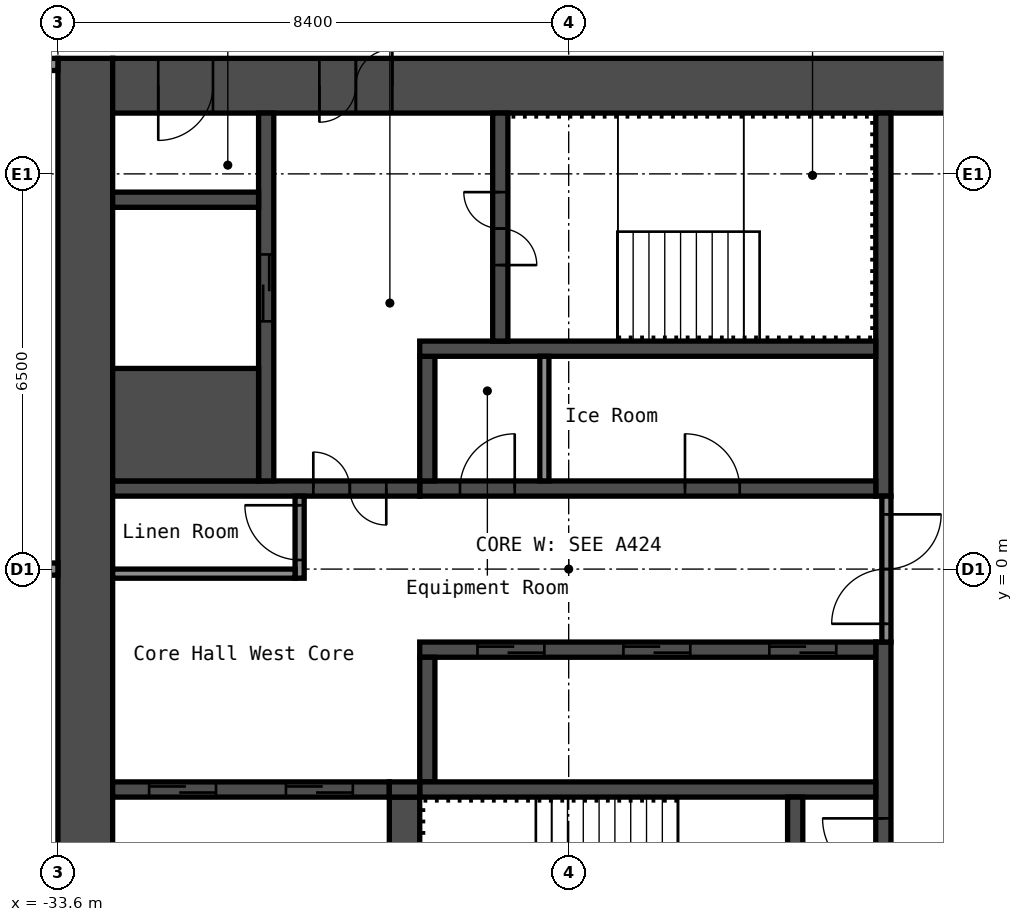
"""IFC4 building model, lengths in metres.
Left out: names, types, materials, properties, quantities, classifications, styles, units other than length and angle.
Written with IfcOpenShell. Run it as: python <this file> out.ifc"""

import sys

from ifc_helpers import new_model, si_unit, direction, frame, frame_2d, origin, place, context, subcontext, project, spatial, rectangle, extrude, element, fill, save


model = new_model("IFC4")
c1 = context("Model", 3, precision=1e-05, world=origin(), true_north=direction((0.0, 1.0)))
c2 = subcontext(c1, "Body", "Model", "MODEL_VIEW")
j1 = project(units=[si_unit("LENGTHUNIT", "METRE"), si_unit("PLANEANGLEUNIT", "RADIAN")], contexts=[c1])
p1 = place(None, origin())
s1 = spatial("IfcSite", under=j1, at=p1, CompositionType="ELEMENT")
p2 = place(p1, origin())
s2 = spatial("IfcBuilding", under=s1, at=p2, CompositionType="ELEMENT")
p3 = place(p2, frame((0.0, 0.0, 163.0)))
s3 = spatial("IfcBuildingStorey", under=s2, at=p3, CompositionType="ELEMENT", Elevation=163.0)
p4 = place(p3, frame((-33.15, -8.4, 0.0), z_axis=(0.0, 0.0, 1.0), x_axis=(0.0, 1.0, 0.0)))
e1 = element("IfcWall", 1, at=p4, inside=s3, PredefinedType="SHEAR", context=c2, shape_type="SweptSolid", body=[
    extrude(rectangle(XDim=16.8, YDim=0.9, at=frame_2d((8.4, 0.0))), origin(), (0.0, 0.0, 1.0), 2.75),
])
p5 = place(p3, frame((-32.7, 7.95, 0.0), z_axis=(0.0, 0.0, 1.0), x_axis=(1.0, 0.0, 0.0)))
e2 = element("IfcWall", 2, at=p5, inside=s3, PredefinedType="SHEAR", context=c2, shape_type="SweptSolid", body=[
    extrude(rectangle(XDim=15.0, YDim=0.9, at=frame_2d((7.5, 0.0))), origin(), (0.0, 0.0, 1.0), 2.75),
])
p6 = place(p5, frame((3.4, 0.0, 0.0)))
e3 = element("IfcOpeningElement", 3, at=p6, cuts=e2, PredefinedType="OPENING", context=c2, shape_type="SweptSolid", body=[
    extrude(rectangle(XDim=1.2, YDim=2.1, at=frame_2d((0.6, 1.05))), frame((0.0, 0.46, 0.0), z_axis=(0.0, -1.0, 0.0), x_axis=(1.0, 0.0, 0.0)), (0.0, 0.0, 1.0), 0.92),
])
p7 = place(p5, frame((0.75, 0.0, 0.0)))
e4 = element("IfcOpeningElement", 4, at=p7, cuts=e2, PredefinedType="OPENING", context=c2, shape_type="SweptSolid", body=[
    extrude(rectangle(XDim=0.9, YDim=2.1, at=frame_2d((0.45, 1.05))), frame((0.0, 0.46, 0.0), z_axis=(0.0, -1.0, 0.0), x_axis=(1.0, 0.0, 0.0)), (0.0, 0.0, 1.0), 0.92),
])
p8 = place(p3, frame((-20.025, 1.2, 0.0), z_axis=(0.0, 0.0, 1.0), x_axis=(0.0, 1.0, 0.0)))
e5 = element("IfcWall", 5, at=p8, inside=s3, PredefinedType="SHEAR", context=c2, shape_type="SweptSolid", body=[
    extrude(rectangle(XDim=6.3, YDim=0.25, at=frame_2d((3.15, 0.0))), origin(), (0.0, 0.0, 1.0), 2.75),
])
p9 = place(p3, frame((-20.025, -7.5, 0.0), z_axis=(0.0, 0.0, 1.0), x_axis=(0.0, 1.0, 0.0)))
e6 = element("IfcWall", 6, at=p9, inside=s3, PredefinedType="SHEAR", context=c2, shape_type="SweptSolid", body=[
    extrude(rectangle(XDim=6.3, YDim=0.25, at=frame_2d((3.15, 0.0))), origin(), (0.0, 0.0, 1.0), 2.75),
])
p10 = place(p9, frame((2.4, 0.0, 0.0)))
e7 = element("IfcOpeningElement", 7, at=p10, cuts=e6, PredefinedType="OPENING", context=c2, shape_type="SweptSolid", body=[
    extrude(rectangle(XDim=1.0, YDim=2.1, at=frame_2d((0.5, 1.05))), frame((0.0, 0.135, 0.0), z_axis=(0.0, -1.0, 0.0), x_axis=(1.0, 0.0, 0.0)), (0.0, 0.0, 1.0), 0.27),
])
p11 = place(p3, frame((-27.65, 1.325, 0.0), z_axis=(0.0, 0.0, 1.0), x_axis=(1.0, 0.0, 0.0)))
e8 = element("IfcWall", 8, at=p11, inside=s3, PredefinedType="SHEAR", context=c2, shape_type="SweptSolid", body=[
    extrude(rectangle(XDim=7.5, YDim=0.25, at=frame_2d((3.75, 0.0))), origin(), (0.0, 0.0, 1.0), 2.75),
])
p12 = place(p11, frame((4.363, 0.0, 0.0)))
e9 = element("IfcOpeningElement", 9, at=p12, cuts=e8, PredefinedType="OPENING", context=c2, shape_type="SweptSolid", body=[
    extrude(rectangle(XDim=0.9, YDim=2.1, at=frame_2d((0.45, 1.05))), frame((0.0, 0.135, 0.0), z_axis=(0.0, -1.0, 0.0), x_axis=(1.0, 0.0, 0.0)), (0.0, 0.0, 1.0), 0.27),
])
p13 = place(p11, frame((0.663, 0.0, 0.0)))
e10 = element("IfcOpeningElement", 10, at=p13, cuts=e8, PredefinedType="OPENING", context=c2, shape_type="SweptSolid", body=[
    extrude(rectangle(XDim=0.9, YDim=2.1, at=frame_2d((0.45, 1.05))), frame((0.0, 0.135, 0.0), z_axis=(0.0, -1.0, 0.0), x_axis=(1.0, 0.0, 0.0)), (0.0, 0.0, 1.0), 0.27),
])
p14 = place(p3, frame((-27.525, 1.45, 0.0), z_axis=(0.0, 0.0, 1.0), x_axis=(0.0, 1.0, 0.0)))
e11 = element("IfcWall", 11, at=p14, inside=s3, PredefinedType="SHEAR", context=c2, shape_type="SweptSolid", body=[
    extrude(rectangle(XDim=2.05, YDim=0.25, at=frame_2d((1.025, 0.0))), origin(), (0.0, 0.0, 1.0), 2.75),
])
p15 = place(p3, frame((-27.65, 3.625, 0.0), z_axis=(0.0, 0.0, 1.0), x_axis=(1.0, 0.0, 0.0)))
e12 = element("IfcWall", 12, at=p15, inside=s3, PredefinedType="SHEAR", context=c2, shape_type="SweptSolid", body=[
    extrude(rectangle(XDim=7.5, YDim=0.25, at=frame_2d((3.75, 0.0))), origin(), (0.0, 0.0, 1.0), 2.75),
])
p16 = place(p3, frame((-26.325, 3.75, 0.0), z_axis=(0.0, 0.0, 1.0), x_axis=(0.0, 1.0, 0.0)))
e13 = element("IfcWall", 13, at=p16, inside=s3, PredefinedType="SHEAR", context=c2, shape_type="SweptSolid", body=[
    extrude(rectangle(XDim=3.75, YDim=0.25, at=frame_2d((1.875, 0.0))), origin(), (0.0, 0.0, 1.0), 2.75),
])
p17 = place(p16, frame((1.25, 0.0, 0.0)))
e14 = element("IfcOpeningElement", 14, at=p17, cuts=e13, PredefinedType="OPENING", context=c2, shape_type="SweptSolid", body=[
    extrude(rectangle(XDim=1.2, YDim=2.1, at=frame_2d((0.6, 1.05))), frame((0.0, 0.135, 0.0), z_axis=(0.0, -1.0, 0.0), x_axis=(1.0, 0.0, 0.0)), (0.0, 0.0, 1.0), 0.27),
])
p18 = place(p3, frame((-32.7, 1.325, 0.0), z_axis=(0.0, 0.0, 1.0), x_axis=(1.0, 0.0, 0.0)))
e15 = element("IfcWall", 15, at=p18, inside=s3, PredefinedType="SHEAR", context=c2, shape_type="SweptSolid", body=[
    extrude(rectangle(XDim=5.05, YDim=0.25, at=frame_2d((2.525, 0.0))), origin(), (0.0, 0.0, 1.0), 2.75),
])
p19 = place(p18, frame((3.3, 0.0, 0.0)))
e16 = element("IfcOpeningElement", 16, at=p19, cuts=e15, PredefinedType="OPENING", context=c2, shape_type="SweptSolid", body=[
    extrude(rectangle(XDim=1.2, YDim=2.1, at=frame_2d((0.6, 1.05))), frame((0.0, 0.135, 0.0), z_axis=(0.0, -1.0, 0.0), x_axis=(1.0, 0.0, 0.0)), (0.0, 0.0, 1.0), 0.27),
])
p20 = place(p3, frame((-30.175, 1.45, 0.0), z_axis=(0.0, 0.0, 1.0), x_axis=(0.0, 1.0, 0.0)))
e17 = element("IfcWall", 17, at=p20, inside=s3, PredefinedType="SHEAR", context=c2, shape_type="SweptSolid", body=[
    extrude(rectangle(XDim=6.05, YDim=0.25, at=frame_2d((3.025, 0.0))), origin(), (0.0, 0.0, 1.0), 2.75),
])
p21 = place(p20, frame((2.625, 0.0, 0.0)))
e18 = element("IfcOpeningElement", 18, at=p21, cuts=e17, PredefinedType="OPENING", context=c2, shape_type="SweptSolid", body=[
    extrude(rectangle(XDim=1.1, YDim=2.1, at=frame_2d((0.55, 1.05))), frame((0.0, 0.135, 0.0), z_axis=(0.0, -1.0, 0.0), x_axis=(1.0, 0.0, 0.0)), (0.0, 0.0, 1.0), 0.27),
])
p22 = place(p3, frame((-32.7, 2.375, 0.0), z_axis=(0.0, 0.0, 1.0), x_axis=(1.0, 0.0, 0.0)))
e19 = element("IfcWall", 19, at=p22, inside=s3, PredefinedType="SHEAR", context=c2, shape_type="SweptSolid", body=[
    extrude(rectangle(XDim=2.4, YDim=1.85, at=frame_2d((1.2, 0.0))), origin(), (0.0, 0.0, 1.0), 2.75),
])
p23 = place(p3, frame((-32.7, 6.075, 0.0), z_axis=(0.0, 0.0, 1.0), x_axis=(1.0, 0.0, 0.0)))
e20 = element("IfcWall", 20, at=p23, inside=s3, PredefinedType="SHEAR", context=c2, shape_type="SweptSolid", body=[
    extrude(rectangle(XDim=2.4, YDim=0.25, at=frame_2d((1.2, 0.0))), origin(), (0.0, 0.0, 1.0), 2.75),
])
p24 = place(p3, frame((-27.65, -1.325, 0.0), z_axis=(0.0, 0.0, 1.0), x_axis=(1.0, 0.0, 0.0)))
e21 = element("IfcWall", 21, at=p24, inside=s3, PredefinedType="SHEAR", context=c2, shape_type="SweptSolid", body=[
    extrude(rectangle(XDim=7.5, YDim=0.25, at=frame_2d((3.75, 0.0))), origin(), (0.0, 0.0, 1.0), 2.75),
])
p25 = place(p24, frame((5.75, 0.0, 0.0)))
e22 = element("IfcOpeningElement", 22, at=p25, cuts=e21, PredefinedType="OPENING", context=c2, shape_type="SweptSolid", body=[
    extrude(rectangle(XDim=1.1, YDim=2.1, at=frame_2d((0.55, 1.05))), frame((0.0, 0.135, 0.0), z_axis=(0.0, -1.0, 0.0), x_axis=(1.0, 0.0, 0.0)), (0.0, 0.0, 1.0), 0.27),
])
p26 = place(p24, frame((3.35, 0.0, 0.0)))
e23 = element("IfcOpeningElement", 23, at=p26, cuts=e21, PredefinedType="OPENING", context=c2, shape_type="SweptSolid", body=[
    extrude(rectangle(XDim=1.1, YDim=2.1, at=frame_2d((0.55, 1.05))), frame((0.0, 0.135, 0.0), z_axis=(0.0, -1.0, 0.0), x_axis=(1.0, 0.0, 0.0)), (0.0, 0.0, 1.0), 0.27),
])
p27 = place(p24, frame((0.95, 0.0, 0.0)))
e24 = element("IfcOpeningElement", 24, at=p27, cuts=e21, PredefinedType="OPENING", context=c2, shape_type="SweptSolid", body=[
    extrude(rectangle(XDim=1.1, YDim=2.1, at=frame_2d((0.55, 1.05))), frame((0.0, 0.135, 0.0), z_axis=(0.0, -1.0, 0.0), x_axis=(1.0, 0.0, 0.0)), (0.0, 0.0, 1.0), 0.27),
])
p28 = place(p3, frame((-27.525, -3.5, 0.0), z_axis=(0.0, 0.0, 1.0), x_axis=(0.0, 1.0, 0.0)))
e25 = element("IfcWall", 25, at=p28, inside=s3, PredefinedType="SHEAR", context=c2, shape_type="SweptSolid", body=[
    extrude(rectangle(XDim=2.05, YDim=0.25, at=frame_2d((1.025, 0.0))), origin(), (0.0, 0.0, 1.0), 2.75),
])
p29 = place(p3, frame((-27.65, -3.625, 0.0), z_axis=(0.0, 0.0, 1.0), x_axis=(1.0, 0.0, 0.0)))
e26 = element("IfcWall", 26, at=p29, inside=s3, PredefinedType="SHEAR", context=c2, shape_type="SweptSolid", body=[
    extrude(rectangle(XDim=7.5, YDim=0.25, at=frame_2d((3.75, 0.0))), origin(), (0.0, 0.0, 1.0), 2.75),
])
p30 = place(p3, frame((-21.475, -7.5, 0.0), z_axis=(0.0, 0.0, 1.0), x_axis=(0.0, 1.0, 0.0)))
e27 = element("IfcWall", 27, at=p30, inside=s3, PredefinedType="SHEAR", context=c2, shape_type="SweptSolid", body=[
    extrude(rectangle(XDim=3.75, YDim=0.25, at=frame_2d((1.875, 0.0))), origin(), (0.0, 0.0, 1.0), 2.75),
])
p31 = place(p30, frame((1.3, 0.0, 0.0)))
e28 = element("IfcOpeningElement", 28, at=p31, cuts=e27, PredefinedType="OPENING", context=c2, shape_type="SweptSolid", body=[
    extrude(rectangle(XDim=1.2, YDim=2.1, at=frame_2d((0.6, 1.05))), frame((0.0, 0.135, 0.0), z_axis=(0.0, -1.0, 0.0), x_axis=(1.0, 0.0, 0.0)), (0.0, 0.0, 1.0), 0.27),
])
p32 = place(p3, frame((-27.9, -7.5, 0.0), z_axis=(0.0, 0.0, 1.0), x_axis=(0.0, 1.0, 0.0)))
e29 = element("IfcWall", 29, at=p32, inside=s3, PredefinedType="SHEAR", context=c2, shape_type="SweptSolid", body=[
    extrude(rectangle(XDim=3.75, YDim=0.5, at=frame_2d((1.875, 0.0))), origin(), (0.0, 0.0, 1.0), 2.75),
])
p33 = place(p3, frame((-32.7, -3.625, 0.0), z_axis=(0.0, 0.0, 1.0), x_axis=(1.0, 0.0, 0.0)))
e30 = element("IfcWall", 30, at=p33, inside=s3, PredefinedType="SHEAR", context=c2, shape_type="SweptSolid", body=[
    extrude(rectangle(XDim=4.55, YDim=0.25, at=frame_2d((2.275, 0.0))), origin(), (0.0, 0.0, 1.0), 2.75),
])
p34 = place(p33, frame((2.85, 0.0, 0.0)))
e31 = element("IfcOpeningElement", 31, at=p34, cuts=e30, PredefinedType="OPENING", context=c2, shape_type="SweptSolid", body=[
    extrude(rectangle(XDim=1.1, YDim=2.1, at=frame_2d((0.55, 1.05))), frame((0.0, 0.135, 0.0), z_axis=(0.0, -1.0, 0.0), x_axis=(1.0, 0.0, 0.0)), (0.0, 0.0, 1.0), 0.27),
])
p35 = place(p33, frame((0.6, 0.0, 0.0)))
e32 = element("IfcOpeningElement", 32, at=p35, cuts=e30, PredefinedType="OPENING", context=c2, shape_type="SweptSolid", body=[
    extrude(rectangle(XDim=1.1, YDim=2.1, at=frame_2d((0.55, 1.05))), frame((0.0, 0.135, 0.0), z_axis=(0.0, -1.0, 0.0), x_axis=(1.0, 0.0, 0.0)), (0.0, 0.0, 1.0), 0.27),
])
p36 = place(p3, frame((-28.15, -3.625, 0.0), z_axis=(0.0, 0.0, 1.0), x_axis=(1.0, 0.0, 0.0)))
e33 = element("IfcWall", 33, at=p36, inside=s3, PredefinedType="SHEAR", context=c2, shape_type="SweptSolid", body=[
    extrude(rectangle(XDim=0.5, YDim=0.25, at=frame_2d((0.25, 0.0))), origin(), (0.0, 0.0, 1.0), 2.75),
])
p37 = place(p3, frame((-19.975, -1.2, 0.0), z_axis=(0.0, 0.0, 1.0), x_axis=(0.0, 1.0, 0.0)))
e34 = element("IfcWall", 34, at=p37, inside=s3, PredefinedType="PARTITIONING", context=c2, shape_type="SweptSolid", body=[
    extrude(rectangle(XDim=2.4, YDim=0.15, at=frame_2d((1.2, 0.0))), origin(), (0.0, 0.0, 1.0), 2.75),
])
p38 = place(p37, frame((0.3, 0.0, 0.0)))
e35 = element("IfcOpeningElement", 35, at=p38, cuts=e34, PredefinedType="OPENING", context=c2, shape_type="SweptSolid", body=[
    extrude(rectangle(XDim=1.8, YDim=2.1, at=frame_2d((0.9, 1.05))), frame((0.0, 0.085, 0.0), z_axis=(0.0, -1.0, 0.0), x_axis=(1.0, 0.0, 0.0)), (0.0, 0.0, 1.0), 0.17),
])
p39 = place(p3, frame((-29.625, -0.15, 0.0), z_axis=(0.0, 0.0, 1.0), x_axis=(0.0, 1.0, 0.0)))
e36 = element("IfcWall", 36, at=p39, inside=s3, PredefinedType="PARTITIONING", context=c2, shape_type="SweptSolid", body=[
    extrude(rectangle(XDim=1.35, YDim=0.15, at=frame_2d((0.675, 0.0))), origin(), (0.0, 0.0, 1.0), 2.75),
])
p40 = place(p39, frame((0.3, 0.0, 0.0)))
e37 = element("IfcOpeningElement", 37, at=p40, cuts=e36, PredefinedType="OPENING", context=c2, shape_type="SweptSolid", body=[
    extrude(rectangle(XDim=0.9, YDim=2.1, at=frame_2d((0.45, 1.05))), frame((0.0, 0.085, 0.0), z_axis=(0.0, -1.0, 0.0), x_axis=(1.0, 0.0, 0.0)), (0.0, 0.0, 1.0), 0.17),
])
p41 = place(p3, frame((-32.7, -0.075, 0.0), z_axis=(0.0, 0.0, 1.0), x_axis=(1.0, 0.0, 0.0)))
e38 = element("IfcWall", 38, at=p41, inside=s3, PredefinedType="PARTITIONING", context=c2, shape_type="SweptSolid", body=[
    extrude(rectangle(XDim=3.0, YDim=0.15, at=frame_2d((1.5, 0.0))), origin(), (0.0, 0.0, 1.0), 2.75),
])
p42 = place(p3, frame((-25.6, 1.45, 0.0), z_axis=(0.0, 0.0, 1.0), x_axis=(0.0, 1.0, 0.0)))
e39 = element("IfcWall", 39, at=p42, inside=s3, PredefinedType="PARTITIONING", context=c2, shape_type="SweptSolid", body=[
    extrude(rectangle(XDim=2.05, YDim=0.15, at=frame_2d((1.025, 0.0))), origin(), (0.0, 0.0, 1.0), 2.75),
])
p43 = place(p3, frame((-40.1, 0.0, 0.0), z_axis=(0.0, 0.0, 1.0), x_axis=(1.0, 0.0, 0.0)))
e40 = element("IfcWall", 40, at=p43, inside=s3, PredefinedType="PARTITIONING", context=c2, shape_type="SweptSolid", body=[
    extrude(rectangle(XDim=6.5, YDim=0.2, at=frame_2d((3.25, 0.0))), origin(), (0.0, 0.0, 1.0), 2.75),
])
p44 = place(p3, frame((-40.2, 8.3, 0.0), z_axis=(0.0, 0.0, 1.0), x_axis=(1.0, 0.0, 0.0)))
e41 = element("IfcWall", 41, at=p44, inside=s3, PredefinedType="PARTITIONING", context=c2, shape_type="SweptSolid", body=[
    extrude(rectangle(XDim=6.6, YDim=0.2, at=frame_2d((3.3, 0.0))), origin(), (0.0, 0.0, 1.0), 2.75),
])
p45 = place(p44, frame((0.805, 0.0, 0.0)))
e42 = element("IfcOpeningElement", 42, at=p45, cuts=e41, PredefinedType="OPENING", context=c2, shape_type="SweptSolid", body=[
    extrude(rectangle(XDim=0.9, YDim=2.1, at=frame_2d((0.45, 1.05))), frame((0.0, 0.11, 0.0), z_axis=(0.0, -1.0, 0.0), x_axis=(1.0, 0.0, 0.0)), (0.0, 0.0, 1.0), 0.22),
])
p46 = place(p44, frame((4.105, 0.0, 0.0)))
e43 = element("IfcOpeningElement", 43, at=p46, cuts=e41, PredefinedType="OPENING", context=c2, shape_type="SweptSolid", body=[
    extrude(rectangle(XDim=0.9, YDim=2.1, at=frame_2d((0.45, 1.05))), frame((0.0, 0.11, 0.0), z_axis=(0.0, -1.0, 0.0), x_axis=(1.0, 0.0, 0.0)), (0.0, 0.0, 1.0), 0.22),
])
p47 = place(p6, origin())
e44 = element("IfcDoor", 44, at=p47, inside=s3, OperationType="DOUBLE_DOOR_SINGLE_SWING", PredefinedType="DOOR", context=c2, shape_type="SweptSolid", body=[
    extrude(rectangle(XDim=1.2, YDim=2.1, at=frame_2d((0.6, 1.05))), frame((0.0, 0.025, 0.0), z_axis=(0.0, -1.0, 0.0), x_axis=(1.0, 0.0, 0.0)), (0.0, 0.0, 1.0), 0.05),
])
fill(e3, e44)
p48 = place(p7, origin())
e45 = element("IfcDoor", 45, at=p48, inside=s3, OperationType="SINGLE_SWING_LEFT", PredefinedType="DOOR", context=c2, shape_type="SweptSolid", body=[
    extrude(rectangle(XDim=0.9, YDim=2.1, at=frame_2d((0.45, 1.05))), frame((0.0, 0.025, 0.0), z_axis=(0.0, -1.0, 0.0), x_axis=(1.0, 0.0, 0.0)), (0.0, 0.0, 1.0), 0.05),
])
fill(e4, e45)
p49 = place(p17, origin())
e46 = element("IfcDoor", 46, at=p49, inside=s3, OperationType="DOUBLE_DOOR_SINGLE_SWING", PredefinedType="DOOR", context=c2, shape_type="SweptSolid", body=[
    extrude(rectangle(XDim=1.2, YDim=2.1, at=frame_2d((0.6, 1.05))), frame((0.0, 0.025, 0.0), z_axis=(0.0, -1.0, 0.0), x_axis=(1.0, 0.0, 0.0)), (0.0, 0.0, 1.0), 0.05),
])
fill(e14, e46)
p50 = place(p10, origin())
e47 = element("IfcDoor", 47, at=p50, inside=s3, OperationType="SINGLE_SWING_LEFT", PredefinedType="DOOR", context=c2, shape_type="SweptSolid", body=[
    extrude(rectangle(XDim=1.0, YDim=2.1, at=frame_2d((0.5, 1.05))), frame((0.0, 0.025, 0.0), z_axis=(0.0, -1.0, 0.0), x_axis=(1.0, 0.0, 0.0)), (0.0, 0.0, 1.0), 0.05),
])
fill(e7, e47)
p51 = place(p19, origin())
e48 = element("IfcDoor", 48, at=p51, inside=s3, OperationType="DOUBLE_DOOR_SINGLE_SWING", PredefinedType="DOOR", context=c2, shape_type="SweptSolid", body=[
    extrude(rectangle(XDim=1.2, YDim=2.1, at=frame_2d((0.6, 1.05))), frame((0.0, 0.025, 0.0), z_axis=(0.0, -1.0, 0.0), x_axis=(1.0, 0.0, 0.0)), (0.0, 0.0, 1.0), 0.05),
])
fill(e16, e48)
p52 = place(p38, origin())
e49 = element("IfcDoor", 49, at=p52, inside=s3, OperationType="DOUBLE_DOOR_SINGLE_SWING", PredefinedType="DOOR", context=c2, shape_type="SweptSolid", body=[
    extrude(rectangle(XDim=1.8, YDim=2.1, at=frame_2d((0.9, 1.05))), frame((0.0, 0.025, 0.0), z_axis=(0.0, -1.0, 0.0), x_axis=(1.0, 0.0, 0.0)), (0.0, 0.0, 1.0), 0.05),
])
fill(e35, e49)
p53 = place(p40, origin())
e50 = element("IfcDoor", 50, at=p53, inside=s3, OperationType="SINGLE_SWING_LEFT", PredefinedType="DOOR", context=c2, shape_type="SweptSolid", body=[
    extrude(rectangle(XDim=0.9, YDim=2.1, at=frame_2d((0.45, 1.05))), frame((0.0, 0.025, 0.0), z_axis=(0.0, -1.0, 0.0), x_axis=(1.0, 0.0, 0.0)), (0.0, 0.0, 1.0), 0.05),
])
fill(e37, e50)
p54 = place(p12, origin())
e51 = element("IfcDoor", 51, at=p54, inside=s3, OperationType="SINGLE_SWING_RIGHT", PredefinedType="DOOR", context=c2, shape_type="SweptSolid", body=[
    extrude(rectangle(XDim=0.9, YDim=2.1, at=frame_2d((0.45, 1.05))), frame((0.0, 0.025, 0.0), z_axis=(0.0, -1.0, 0.0), x_axis=(1.0, 0.0, 0.0)), (0.0, 0.0, 1.0), 0.05),
])
fill(e9, e51)
p55 = place(p13, origin())
e52 = element("IfcDoor", 52, at=p55, inside=s3, OperationType="SINGLE_SWING_LEFT", PredefinedType="DOOR", context=c2, shape_type="SweptSolid", body=[
    extrude(rectangle(XDim=0.9, YDim=2.1, at=frame_2d((0.45, 1.05))), frame((0.0, 0.025, 0.0), z_axis=(0.0, -1.0, 0.0), x_axis=(1.0, 0.0, 0.0)), (0.0, 0.0, 1.0), 0.05),
])
fill(e10, e52)
p56 = place(p25, origin())
e53 = element("IfcDoor", 53, at=p56, inside=s3, OperationType="DOUBLE_DOOR_SLIDING", PredefinedType="DOOR", context=c2, shape_type="SweptSolid", body=[
    extrude(rectangle(XDim=1.1, YDim=2.1, at=frame_2d((0.55, 1.05))), frame((0.0, 0.025, 0.0), z_axis=(0.0, -1.0, 0.0), x_axis=(1.0, 0.0, 0.0)), (0.0, 0.0, 1.0), 0.05),
])
fill(e22, e53)
p57 = place(p26, origin())
e54 = element("IfcDoor", 54, at=p57, inside=s3, OperationType="DOUBLE_DOOR_SLIDING", PredefinedType="DOOR", context=c2, shape_type="SweptSolid", body=[
    extrude(rectangle(XDim=1.1, YDim=2.1, at=frame_2d((0.55, 1.05))), frame((0.0, 0.025, 0.0), z_axis=(0.0, -1.0, 0.0), x_axis=(1.0, 0.0, 0.0)), (0.0, 0.0, 1.0), 0.05),
])
fill(e23, e54)
p58 = place(p27, origin())
e55 = element("IfcDoor", 55, at=p58, inside=s3, OperationType="DOUBLE_DOOR_SLIDING", PredefinedType="DOOR", context=c2, shape_type="SweptSolid", body=[
    extrude(rectangle(XDim=1.1, YDim=2.1, at=frame_2d((0.55, 1.05))), frame((0.0, 0.025, 0.0), z_axis=(0.0, -1.0, 0.0), x_axis=(1.0, 0.0, 0.0)), (0.0, 0.0, 1.0), 0.05),
])
fill(e24, e55)
p59 = place(p21, origin())
e56 = element("IfcDoor", 56, at=p59, inside=s3, OperationType="DOUBLE_DOOR_SLIDING", PredefinedType="DOOR", context=c2, shape_type="SweptSolid", body=[
    extrude(rectangle(XDim=1.1, YDim=2.1, at=frame_2d((0.55, 1.05))), frame((0.0, 0.025, 0.0), z_axis=(0.0, -1.0, 0.0), x_axis=(1.0, 0.0, 0.0)), (0.0, 0.0, 1.0), 0.05),
])
fill(e18, e56)
p60 = place(p34, origin())
e57 = element("IfcDoor", 57, at=p60, inside=s3, OperationType="DOUBLE_DOOR_SLIDING", PredefinedType="DOOR", context=c2, shape_type="SweptSolid", body=[
    extrude(rectangle(XDim=1.1, YDim=2.1, at=frame_2d((0.55, 1.05))), frame((0.0, 0.025, 0.0), z_axis=(0.0, -1.0, 0.0), x_axis=(1.0, 0.0, 0.0)), (0.0, 0.0, 1.0), 0.05),
])
fill(e31, e57)
p61 = place(p35, origin())
e58 = element("IfcDoor", 58, at=p61, inside=s3, OperationType="DOUBLE_DOOR_SLIDING", PredefinedType="DOOR", context=c2, shape_type="SweptSolid", body=[
    extrude(rectangle(XDim=1.1, YDim=2.1, at=frame_2d((0.55, 1.05))), frame((0.0, 0.025, 0.0), z_axis=(0.0, -1.0, 0.0), x_axis=(1.0, 0.0, 0.0)), (0.0, 0.0, 1.0), 0.05),
])
fill(e32, e58)
save(model, sys.argv[1])
